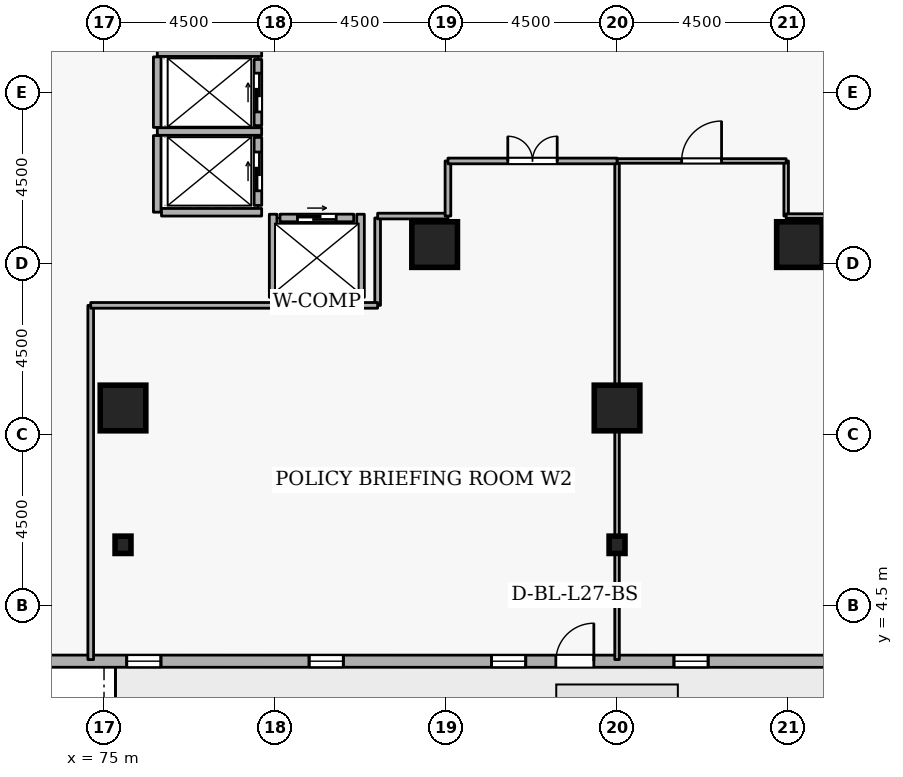
"""IFC4 building model, lengths in metres.
Left out: names, types, materials, properties, quantities, classifications, styles, units other than length and angle.
Written with IfcOpenShell. Run it as: python <this file> out.ifc"""

import sys

from ifc_helpers import new_model, si_unit, direction, frame, frame_2d, origin, origin_2d, place, context, subcontext, project, spatial, rectangle, i_section, extrude, element, fill, save


model = new_model("IFC4")
c1 = context("Model", 3, precision=1e-05, world=origin(), true_north=direction((0.0, 1.0)))
c2 = subcontext(c1, "Body", "Model", "MODEL_VIEW")
j1 = project(units=[si_unit("LENGTHUNIT", "METRE"), si_unit("PLANEANGLEUNIT", "RADIAN")], contexts=[c1])
p1 = place(None, origin())
s1 = spatial("IfcSite", under=j1, at=p1, CompositionType="ELEMENT")
p2 = place(p1, origin())
s2 = spatial("IfcBuilding", under=s1, at=p2, CompositionType="ELEMENT")
p3 = place(p2, frame((0.0, 0.0, 105.3)))
s3 = spatial("IfcBuildingStorey", under=s2, at=p3, CompositionType="ELEMENT", Elevation=105.3)
for number, where, z_axis, x_axis in (
    (1, (88.5, 9.7, 0.0), (0.0, 0.0, 1.0), (1.0, 0.0, 0.0)),
    (2, (75.5, 9.7, 0.0), (0.0, 0.0, 1.0), (1.0, 0.0, 0.0)),
    (3, (93.3, 14.0, 0.0), (0.0, 0.0, 1.0), (1.0, 0.0, 0.0)),
    (4, (83.7, 14.0, 0.0), (0.0, 0.0, 1.0), (1.0, 0.0, 0.0)),
):
    element("IfcColumn", number, at=place(p3, frame(where, z_axis=z_axis, x_axis=x_axis)), inside=s3, PredefinedType="COLUMN", context=c2, shape_type="SweptSolid", body=[
        extrude(rectangle(XDim=1.2, YDim=1.2, at=origin_2d()), origin(), (0.0, 0.0, 1.0), 3.6),
    ])
for number, where, z_axis, x_axis in (
    (5, (88.5, 6.1, 0.0), (0.0, 0.0, 1.0), (1.0, 0.0, 0.0)),
    (6, (75.5, 6.1, 0.0), (0.0, 0.0, 1.0), (1.0, 0.0, 0.0)),
):
    element("IfcColumn", number, at=place(p3, frame(where, z_axis=z_axis, x_axis=x_axis)), inside=s3, PredefinedType="COLUMN", context=c2, shape_type="SweptSolid", body=[
        extrude(i_section(OverallWidth=0.418, OverallDepth=0.456, WebThickness=0.042, FlangeThickness=0.067, FilletRadius=0.015, at=origin_2d()), origin(), (0.0, 0.0, 1.0), 3.6),
    ])
p4 = place(p3, frame((68.097, 3.039, 0.0), z_axis=(0.0, 0.0, 1.0), x_axis=(0.999999996067, -8.8693006e-05, 0.0)))
e7 = element("IfcWall", 7, at=p4, inside=s3, PredefinedType="STANDARD", context=c2, shape_type="SweptSolid", body=[
    extrude(rectangle(XDim=35.784, YDim=0.32, at=frame_2d((17.892, 0.0))), origin(), (0.0, 0.0, 1.0), 2.7),
])
p5 = place(p4, frame((18.792, 0.0, 0.0)))
e8 = element("IfcOpeningElement", 8, at=p5, cuts=e7, PredefinedType="OPENING", context=c2, shape_type="SweptSolid", body=[
    extrude(rectangle(XDim=1.0, YDim=2.08, at=frame_2d((0.5, 1.04))), frame((0.0, 0.17, 0.0), z_axis=(0.0, -1.0, 0.0), x_axis=(1.0, 0.0, 0.0)), (0.0, 0.0, 1.0), 0.34),
])
p6 = place(p4, frame((2.7, 0.0, 0.72)))
e9 = element("IfcOpeningElement", 9, at=p6, cuts=e7, PredefinedType="OPENING", context=c2, shape_type="SweptSolid", body=[
    extrude(rectangle(XDim=0.9, YDim=1.75, at=frame_2d((0.45, 0.875))), frame((0.0, 0.17, 0.0), z_axis=(0.0, -1.0, 0.0), x_axis=(1.0, 0.0, 0.0)), (0.0, 0.0, 1.0), 0.34),
])
p7 = place(p4, frame((7.5, 0.0, 0.72)))
e10 = element("IfcOpeningElement", 10, at=p7, cuts=e7, PredefinedType="OPENING", context=c2, shape_type="SweptSolid", body=[
    extrude(rectangle(XDim=0.9, YDim=1.75, at=frame_2d((0.45, 0.875))), frame((0.0, 0.17, 0.0), z_axis=(0.0, -1.0, 0.0), x_axis=(1.0, 0.0, 0.0)), (0.0, 0.0, 1.0), 0.34),
])
p8 = place(p4, frame((12.3, 0.0, 0.72)))
e11 = element("IfcOpeningElement", 11, at=p8, cuts=e7, PredefinedType="OPENING", context=c2, shape_type="SweptSolid", body=[
    extrude(rectangle(XDim=0.9, YDim=1.75, at=frame_2d((0.45, 0.875))), frame((0.0, 0.17, 0.0), z_axis=(0.0, -1.0, 0.0), x_axis=(1.0, 0.0, 0.0)), (0.0, 0.0, 1.0), 0.34),
])
p9 = place(p4, frame((17.1, 0.0, 0.72)))
e12 = element("IfcOpeningElement", 12, at=p9, cuts=e7, PredefinedType="OPENING", context=c2, shape_type="SweptSolid", body=[
    extrude(rectangle(XDim=0.9, YDim=1.75, at=frame_2d((0.45, 0.875))), frame((0.0, 0.17, 0.0), z_axis=(0.0, -1.0, 0.0), x_axis=(1.0, 0.0, 0.0)), (0.0, 0.0, 1.0), 0.34),
])
p10 = place(p4, frame((21.9, 0.0, 0.72)))
e13 = element("IfcOpeningElement", 13, at=p10, cuts=e7, PredefinedType="OPENING", context=c2, shape_type="SweptSolid", body=[
    extrude(rectangle(XDim=0.9, YDim=1.75, at=frame_2d((0.45, 0.875))), frame((0.0, 0.17, 0.0), z_axis=(0.0, -1.0, 0.0), x_axis=(1.0, 0.0, 0.0)), (0.0, 0.0, 1.0), 0.34),
])
p11 = place(p4, frame((26.7, 0.0, 0.72)))
e14 = element("IfcOpeningElement", 14, at=p11, cuts=e7, PredefinedType="OPENING", context=c2, shape_type="SweptSolid", body=[
    extrude(rectangle(XDim=0.9, YDim=1.75, at=frame_2d((0.45, 0.875))), frame((0.0, 0.17, 0.0), z_axis=(0.0, -1.0, 0.0), x_axis=(1.0, 0.0, 0.0)), (0.0, 0.0, 1.0), 0.34),
])
p12 = place(p4, frame((31.5, 0.0, 0.72)))
e15 = element("IfcOpeningElement", 15, at=p12, cuts=e7, PredefinedType="OPENING", context=c2, shape_type="SweptSolid", body=[
    extrude(rectangle(XDim=0.9, YDim=1.75, at=frame_2d((0.45, 0.875))), frame((0.0, 0.17, 0.0), z_axis=(0.0, -1.0, 0.0), x_axis=(1.0, 0.0, 0.0)), (0.0, 0.0, 1.0), 0.34),
])
p13 = place(p3, frame((79.05, 17.13, 0.0), z_axis=(0.0, 0.0, 1.0), x_axis=(0.0, 1.0, 0.0)))
e16 = element("IfcWall", 16, at=p13, inside=s3, PredefinedType="STANDARD", context=c2, shape_type="SweptSolid", body=[
    extrude(rectangle(XDim=1.74, YDim=0.2, at=frame_2d((0.87, 0.0))), origin(), (0.0, 0.0, 1.0), 3.34),
])
p14 = place(p13, frame((0.36, 0.0, 0.0)))
e17 = element("IfcOpeningElement", 17, at=p14, cuts=e16, PredefinedType="OPENING", context=c2, shape_type="SweptSolid", body=[
    extrude(rectangle(XDim=1.02, YDim=2.06, at=frame_2d((0.51, 1.03))), frame((0.0, 0.11, 0.0), z_axis=(0.0, -1.0, 0.0), x_axis=(1.0, 0.0, 0.0)), (0.0, 0.0, 1.0), 0.22),
])
p15 = place(p3, frame((79.05, 15.03, 0.0), z_axis=(0.0, 0.0, 1.0), x_axis=(0.0, 1.0, 0.0)))
e18 = element("IfcWall", 18, at=p15, inside=s3, PredefinedType="STANDARD", context=c2, shape_type="SweptSolid", body=[
    extrude(rectangle(XDim=1.79, YDim=0.2, at=frame_2d((0.895, 0.0))), origin(), (0.0, 0.0, 1.0), 3.34),
])
p16 = place(p15, frame((0.385, 0.0, 0.0)))
e19 = element("IfcOpeningElement", 19, at=p16, cuts=e18, PredefinedType="OPENING", context=c2, shape_type="SweptSolid", body=[
    extrude(rectangle(XDim=1.02, YDim=2.06, at=frame_2d((0.51, 1.03))), frame((0.0, 0.11, 0.0), z_axis=(0.0, -1.0, 0.0), x_axis=(1.0, 0.0, 0.0)), (0.0, 0.0, 1.0), 0.22),
])
p17 = place(p3, frame((79.63, 14.7, 0.0), z_axis=(0.0, 0.0, 1.0), x_axis=(1.0, 0.0, 0.0)))
e20 = element("IfcWall", 20, at=p17, inside=s3, PredefinedType="STANDARD", context=c2, shape_type="SweptSolid", body=[
    extrude(rectangle(XDim=1.94, YDim=0.2, at=frame_2d((0.97, 0.0))), origin(), (0.0, 0.0, 1.0), 3.34),
])
p18 = place(p17, frame((0.46, 0.0, 0.0)))
e21 = element("IfcOpeningElement", 21, at=p18, cuts=e20, PredefinedType="OPENING", context=c2, shape_type="SweptSolid", body=[
    extrude(rectangle(XDim=1.02, YDim=2.06, at=frame_2d((0.51, 1.03))), frame((0.0, 0.11, 0.0), z_axis=(0.0, -1.0, 0.0), x_axis=(1.0, 0.0, 0.0)), (0.0, 0.0, 1.0), 0.22),
])
p19 = place(p3, frame((76.402, 19.05, 0.0), z_axis=(0.0, 0.0, 1.0), x_axis=(1.0, 0.0, 0.0)))
e22 = element("IfcWall", 22, at=p19, inside=s3, PredefinedType="STANDARD", context=c2, shape_type="SweptSolid", body=[
    extrude(rectangle(XDim=2.746, YDim=0.2, at=frame_2d((1.373, 0.0))), origin(), (0.0, 0.0, 1.0), 2.545),
])
p20 = place(p3, frame((76.402, 16.975, 0.0), z_axis=(0.0, 0.0, 1.0), x_axis=(1.0, 0.0, 0.0)))
e23 = element("IfcWall", 23, at=p20, inside=s3, PredefinedType="STANDARD", context=c2, shape_type="SweptSolid", body=[
    extrude(rectangle(XDim=2.746, YDim=0.2, at=frame_2d((1.373, 0.0))), origin(), (0.0, 0.0, 1.0), 3.34),
])
p21 = place(p3, frame((76.4, 14.852, 0.0), z_axis=(0.0, 0.0, 1.0), x_axis=(0.0, 1.0, 0.0)))
e24 = element("IfcWall", 24, at=p21, inside=s3, PredefinedType="STANDARD", context=c2, shape_type="SweptSolid", body=[
    extrude(rectangle(XDim=2.016, YDim=0.2, at=frame_2d((1.008, 0.0))), origin(), (0.0, 0.0, 1.0), 3.34),
])
p22 = place(p3, frame((76.4, 17.082, 0.0), z_axis=(0.0, 0.0, 1.0), x_axis=(0.0, 1.0, 0.0)))
e25 = element("IfcWall", 25, at=p22, inside=s3, PredefinedType="STANDARD", context=c2, shape_type="SweptSolid", body=[
    extrude(rectangle(XDim=1.856, YDim=0.2, at=frame_2d((0.928, 0.0))), origin(), (0.0, 0.0, 1.0), 3.34),
])
p23 = place(p3, frame((76.512, 14.85, 0.0), z_axis=(0.0, 0.0, 1.0), x_axis=(1.0, 0.0, 0.0)))
e26 = element("IfcWall", 26, at=p23, inside=s3, PredefinedType="STANDARD", context=c2, shape_type="SweptSolid", body=[
    extrude(rectangle(XDim=2.636, YDim=0.2, at=frame_2d((1.318, 0.0))), origin(), (0.0, 0.0, 1.0), 3.34),
])
p24 = place(p3, frame((79.452, 12.5, 0.0), z_axis=(0.0, 0.0, 1.0), x_axis=(1.0, 0.0, 0.0)))
e27 = element("IfcWall", 27, at=p24, inside=s3, PredefinedType="STANDARD", context=c2, shape_type="SweptSolid", body=[
    extrude(rectangle(XDim=2.296, YDim=0.2, at=frame_2d((1.148, 0.0))), origin(), (0.0, 0.0, 1.0), 3.34),
])
for number, where, z_axis, x_axis in (
    (28, (81.75, 12.612, 0.0), (0.0, 0.0, 1.0), (0.0, 1.0, 0.0)),
    (29, (79.45, 12.612, 0.0), (0.0, 0.0, 1.0), (0.0, 1.0, 0.0)),
):
    element("IfcWall", number, at=place(p3, frame(where, z_axis=z_axis, x_axis=x_axis)), inside=s3, PredefinedType="STANDARD", context=c2, shape_type="SweptSolid", body=[
        extrude(rectangle(XDim=2.186, YDim=0.2, at=frame_2d((1.093, 0.0))), origin(), (0.0, 0.0, 1.0), 3.34),
    ])
p25 = place(p3, frame((92.95, 16.2, 0.0), z_axis=(0.0, 0.0, 1.0), x_axis=(0.0, -1.0, 0.0)))
e30 = element("IfcWall", 30, at=p25, inside=s3, PredefinedType="PARTITIONING", context=c2, shape_type="SweptSolid", body=[
    extrude(rectangle(XDim=1.45, YDim=0.12, at=frame_2d((0.725, 0.0))), origin(), (0.0, 0.0, 1.0), 3.34),
])
p26 = place(p3, frame((92.95, 14.75, 0.0), z_axis=(0.0, 0.0, 1.0), x_axis=(1.0, 0.0, 0.0)))
e31 = element("IfcWall", 31, at=p26, inside=s3, PredefinedType="PARTITIONING", context=c2, shape_type="SweptSolid", body=[
    extrude(rectangle(XDim=1.85, YDim=0.12, at=frame_2d((0.925, 0.0))), origin(), (0.0, 0.0, 1.0), 3.34),
])
p27 = place(p3, frame((88.5, 3.08, 0.0), z_axis=(0.0, 0.0, 1.0), x_axis=(0.0, 1.0, 0.0)))
e32 = element("IfcWall", 32, at=p27, inside=s3, PredefinedType="PARTITIONING", context=c2, shape_type="SweptSolid", body=[
    extrude(rectangle(XDim=13.12, YDim=0.12, at=frame_2d((6.56, 0.0))), origin(), (0.0, 0.0, 1.0), 2.878),
])
p28 = place(p3, frame((88.5, 16.2, 0.0), z_axis=(0.0, 0.0, 1.0), x_axis=(1.0, 0.0, 0.0)))
e33 = element("IfcWall", 33, at=p28, inside=s3, PredefinedType="PARTITIONING", context=c2, shape_type="SweptSolid", body=[
    extrude(rectangle(XDim=4.45, YDim=0.12, at=frame_2d((2.225, 0.0))), origin(), (0.0, 0.0, 1.0), 3.34),
])
p29 = place(p28, frame((1.7, 0.0, 0.0)))
e34 = element("IfcOpeningElement", 34, at=p29, cuts=e33, PredefinedType="OPENING", context=c2, shape_type="SweptSolid", body=[
    extrude(rectangle(XDim=1.05, YDim=2.1, at=frame_2d((0.525, 1.05))), frame((0.0, 0.07, 0.0), z_axis=(0.0, -1.0, 0.0), x_axis=(1.0, 0.0, 0.0)), (0.0, 0.0, 1.0), 0.14),
])
p30 = place(p3, frame((82.2, 12.4, 0.0), z_axis=(0.0, 0.0, 1.0), x_axis=(0.0, 1.0, 0.0)))
e35 = element("IfcWall", 35, at=p30, inside=s3, PredefinedType="PARTITIONING", context=c2, shape_type="SweptSolid", body=[
    extrude(rectangle(XDim=2.3, YDim=0.15, at=frame_2d((1.15, 0.0))), origin(), (0.0, 0.0, 1.0), 3.34),
])
p31 = place(p3, frame((82.2, 14.75, 0.0), z_axis=(0.0, 0.0, 1.0), x_axis=(1.0, 0.0, 0.0)))
e36 = element("IfcWall", 36, at=p31, inside=s3, PredefinedType="PARTITIONING", context=c2, shape_type="SweptSolid", body=[
    extrude(rectangle(XDim=1.85, YDim=0.15, at=frame_2d((0.925, 0.0))), origin(), (0.0, 0.0, 1.0), 3.34),
])
p32 = place(p3, frame((84.05, 14.75, 0.0), z_axis=(0.0, 0.0, 1.0), x_axis=(0.0, 1.0, 0.0)))
e37 = element("IfcWall", 37, at=p32, inside=s3, PredefinedType="PARTITIONING", context=c2, shape_type="SweptSolid", body=[
    extrude(rectangle(XDim=1.45, YDim=0.15, at=frame_2d((0.725, 0.0))), origin(), (0.0, 0.0, 1.0), 3.34),
])
p33 = place(p3, frame((84.05, 16.2, 0.0), z_axis=(0.0, 0.0, 1.0), x_axis=(1.0, 0.0, 0.0)))
e38 = element("IfcWall", 38, at=p33, inside=s3, PredefinedType="PARTITIONING", context=c2, shape_type="SweptSolid", body=[
    extrude(rectangle(XDim=4.45, YDim=0.15, at=frame_2d((2.225, 0.0))), origin(), (0.0, 0.0, 1.0), 3.34),
])
p34 = place(p33, frame((1.575, 0.0, 0.0)))
e39 = element("IfcOpeningElement", 39, at=p34, cuts=e38, PredefinedType="OPENING", context=c2, shape_type="SweptSolid", body=[
    extrude(rectangle(XDim=1.3, YDim=2.12, at=frame_2d((0.65, 1.06))), frame((0.0, 0.085, 0.0), z_axis=(0.0, -1.0, 0.0), x_axis=(1.0, 0.0, 0.0)), (0.0, 0.0, 1.0), 0.17),
])
p35 = place(p3, frame((74.65, 3.08, 0.0), z_axis=(0.0, 0.0, 1.0), x_axis=(0.0, 1.0, 0.0)))
e40 = element("IfcWall", 40, at=p35, inside=s3, PredefinedType="PARTITIONING", context=c2, shape_type="SweptSolid", body=[
    extrude(rectangle(XDim=9.32, YDim=0.15, at=frame_2d((4.66, 0.0))), origin(), (0.0, 0.0, 1.0), 3.34),
])
p36 = place(p3, frame((74.65, 12.4, 0.0), z_axis=(0.0, 0.0, 1.0), x_axis=(1.0, 0.0, 0.0)))
e41 = element("IfcWall", 41, at=p36, inside=s3, PredefinedType="PARTITIONING", context=c2, shape_type="SweptSolid", body=[
    extrude(rectangle(XDim=4.802, YDim=0.15, at=frame_2d((2.401, 0.0))), origin(), (0.0, 0.0, 1.0), 3.34),
])
p37 = place(p3, frame((81.748, 12.4, 0.0), z_axis=(0.0, 0.0, 1.0), x_axis=(1.0, 0.0, 0.0)))
e42 = element("IfcWall", 42, at=p37, inside=s3, PredefinedType="PARTITIONING", context=c2, shape_type="SweptSolid", body=[
    extrude(rectangle(XDim=0.452, YDim=0.15, at=frame_2d((0.226, 0.0))), origin(), (0.0, 0.0, 1.0), 3.34),
])
p38 = place(p5, origin())
e43 = element("IfcDoor", 43, at=p38, inside=s3, OperationType="SINGLE_SWING_RIGHT", PredefinedType="DOOR", context=c2, shape_type="SweptSolid", body=[
    extrude(rectangle(XDim=1.0, YDim=2.08, at=frame_2d((0.5, 1.04))), frame((0.0, 0.025, 0.0), z_axis=(0.0, -1.0, 0.0), x_axis=(1.0, 0.0, 0.0)), (0.0, 0.0, 1.0), 0.05),
])
fill(e8, e43)
p39 = place(p7, origin())
e44 = element("IfcWindow", 44, at=p39, inside=s3, PartitioningType="SINGLE_PANEL", PredefinedType="WINDOW", context=c2, shape_type="SweptSolid", body=[
    extrude(rectangle(XDim=0.9, YDim=1.75, at=frame_2d((0.45, 0.875))), frame((0.0, 0.03, 0.0), z_axis=(0.0, -1.0, 0.0), x_axis=(1.0, 0.0, 0.0)), (0.0, 0.0, 1.0), 0.06),
])
fill(e10, e44)
p40 = place(p8, origin())
e45 = element("IfcWindow", 45, at=p40, inside=s3, PartitioningType="SINGLE_PANEL", PredefinedType="WINDOW", context=c2, shape_type="SweptSolid", body=[
    extrude(rectangle(XDim=0.9, YDim=1.75, at=frame_2d((0.45, 0.875))), frame((0.0, 0.03, 0.0), z_axis=(0.0, -1.0, 0.0), x_axis=(1.0, 0.0, 0.0)), (0.0, 0.0, 1.0), 0.06),
])
fill(e11, e45)
p41 = place(p9, origin())
e46 = element("IfcWindow", 46, at=p41, inside=s3, PartitioningType="SINGLE_PANEL", PredefinedType="WINDOW", context=c2, shape_type="SweptSolid", body=[
    extrude(rectangle(XDim=0.9, YDim=1.75, at=frame_2d((0.45, 0.875))), frame((0.0, 0.03, 0.0), z_axis=(0.0, -1.0, 0.0), x_axis=(1.0, 0.0, 0.0)), (0.0, 0.0, 1.0), 0.06),
])
fill(e12, e46)
p42 = place(p10, origin())
e47 = element("IfcWindow", 47, at=p42, inside=s3, PartitioningType="SINGLE_PANEL", PredefinedType="WINDOW", context=c2, shape_type="SweptSolid", body=[
    extrude(rectangle(XDim=0.9, YDim=1.75, at=frame_2d((0.45, 0.875))), frame((0.0, 0.03, 0.0), z_axis=(0.0, -1.0, 0.0), x_axis=(1.0, 0.0, 0.0)), (0.0, 0.0, 1.0), 0.06),
])
fill(e13, e47)
p43 = place(p14, origin())
e48 = element("IfcDoor", 48, at=p43, inside=s3, OperationType="SLIDING_TO_LEFT", PredefinedType="DOOR", context=c2, shape_type="SweptSolid", body=[
    extrude(rectangle(XDim=1.02, YDim=2.06, at=frame_2d((0.51, 1.03))), frame((0.0, 0.025, 0.0), z_axis=(0.0, -1.0, 0.0), x_axis=(1.0, 0.0, 0.0)), (0.0, 0.0, 1.0), 0.05),
])
fill(e17, e48)
p44 = place(p16, origin())
e49 = element("IfcDoor", 49, at=p44, inside=s3, OperationType="SLIDING_TO_LEFT", PredefinedType="DOOR", context=c2, shape_type="SweptSolid", body=[
    extrude(rectangle(XDim=1.02, YDim=2.06, at=frame_2d((0.51, 1.03))), frame((0.0, 0.025, 0.0), z_axis=(0.0, -1.0, 0.0), x_axis=(1.0, 0.0, 0.0)), (0.0, 0.0, 1.0), 0.05),
])
fill(e19, e49)
p45 = place(p18, origin())
e50 = element("IfcDoor", 50, at=p45, inside=s3, OperationType="SLIDING_TO_LEFT", PredefinedType="DOOR", context=c2, shape_type="SweptSolid", body=[
    extrude(rectangle(XDim=1.02, YDim=2.06, at=frame_2d((0.51, 1.03))), frame((0.0, 0.025, 0.0), z_axis=(0.0, -1.0, 0.0), x_axis=(1.0, 0.0, 0.0)), (0.0, 0.0, 1.0), 0.05),
])
fill(e21, e50)
p46 = place(p29, origin())
e51 = element("IfcDoor", 51, at=p46, inside=s3, OperationType="SINGLE_SWING_RIGHT", PredefinedType="DOOR", context=c2, shape_type="SweptSolid", body=[
    extrude(rectangle(XDim=1.05, YDim=2.1, at=frame_2d((0.525, 1.05))), frame((0.0, 0.025, 0.0), z_axis=(0.0, -1.0, 0.0), x_axis=(1.0, 0.0, 0.0)), (0.0, 0.0, 1.0), 0.05),
])
fill(e34, e51)
p47 = place(p34, origin())
e52 = element("IfcDoor", 52, at=p47, inside=s3, OperationType="DOUBLE_DOOR_SINGLE_SWING", PredefinedType="DOOR", context=c2, shape_type="SweptSolid", body=[
    extrude(rectangle(XDim=1.3, YDim=2.12, at=frame_2d((0.65, 1.06))), frame((0.0, 0.025, 0.0), z_axis=(0.0, -1.0, 0.0), x_axis=(1.0, 0.0, 0.0)), (0.0, 0.0, 1.0), 0.05),
])
fill(e39, e52)
save(model, sys.argv[1])
